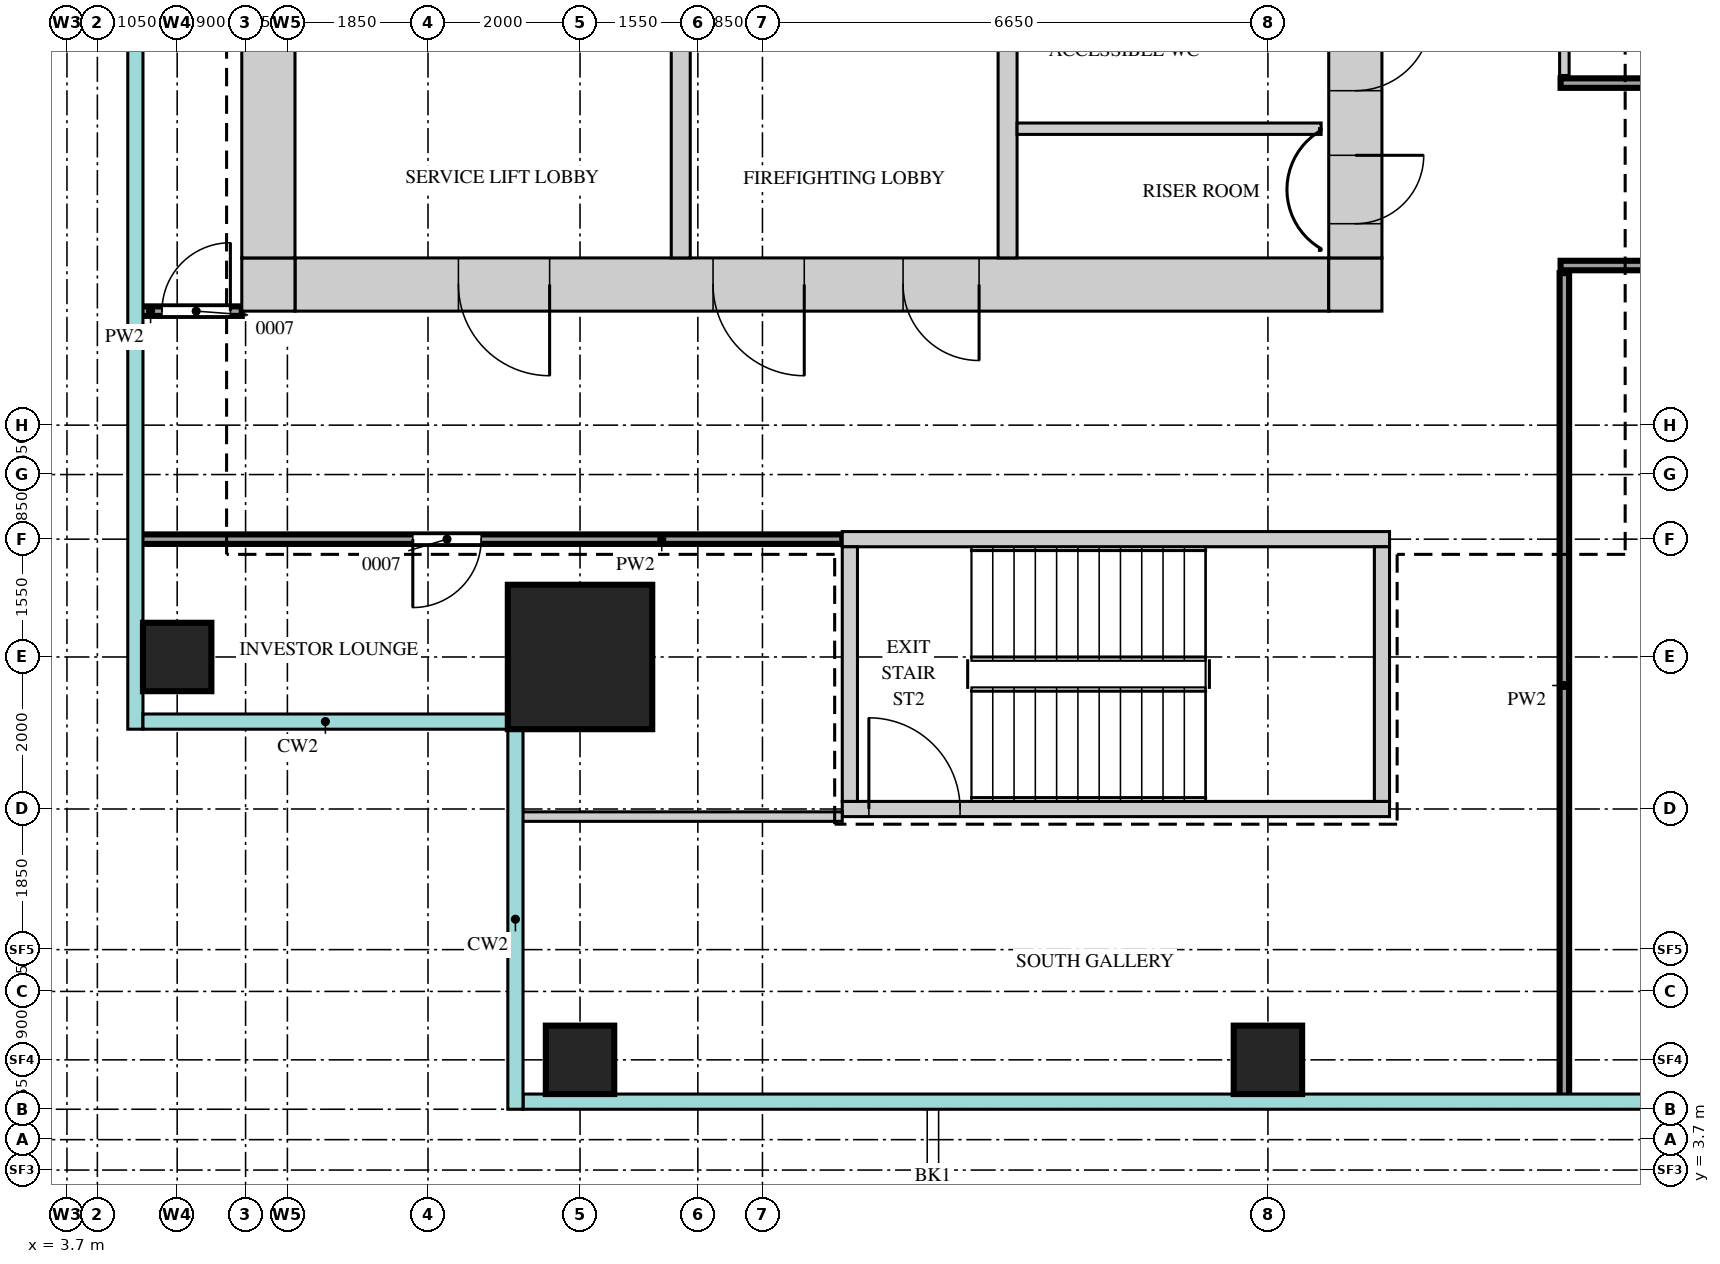
"""IFC4 building model, lengths in metres.
Left out: names, types, materials, properties, quantities, classifications, styles, units other than length and angle.
Written with IfcOpenShell. Run it as: python <this file> out.ifc"""

import sys

from ifc_helpers import new_model, si_unit, direction, frame, frame_2d, origin, origin_2d, place, context, subcontext, project, spatial, rectangle, extrude, source, transform, mapped, element, fill, save


model = new_model("IFC4")
c1 = context("Model", 3, precision=1e-05, world=origin(), true_north=direction((0.0, 1.0)))
c2 = subcontext(c1, "Body", "Model", "MODEL_VIEW")
j1 = project(units=[si_unit("LENGTHUNIT", "METRE"), si_unit("PLANEANGLEUNIT", "RADIAN")], contexts=[c1])
p1 = place(None, origin())
s1 = spatial("IfcSite", under=j1, at=p1, CompositionType="ELEMENT")
p2 = place(p1, origin())
s2 = spatial("IfcBuilding", under=s1, at=p2, CompositionType="ELEMENT")
p3 = place(p2, frame((0.0, 0.0, 238.2)))
s3 = spatial("IfcBuildingStorey", under=s2, at=p3, CompositionType="ELEMENT", Elevation=238.2)
m1 = source(origin(), c2, "Body", "SweptSolid", [
    extrude(rectangle(XDim=13.6, YDim=0.7, at=frame_2d((6.8, 0.0))), origin(), (0.0, 0.0, 1.0), 3.75),
])
p4 = place(p3, frame((6.7, 15.35, 0.0), z_axis=(0.0, 0.0, 1.0), x_axis=(1.0, 0.0, 0.0)))
e1 = element("IfcWall", 1, at=p4, inside=s3, PredefinedType="SHEAR", context=c2, shape_type="MappedRepresentation", body=[
    mapped(m1, transform((0.0, 0.0, 0.0))),
])
m2 = source(origin(), c2, "Body", "SweptSolid", [
    extrude(rectangle(XDim=1.2, YDim=2.1, at=frame_2d((0.6, 1.05))), frame((0.0, 0.36, 0.0), z_axis=(0.0, -1.0, 0.0), x_axis=(1.0, 0.0, 0.0)), (0.0, 0.0, 1.0), 0.72),
])
p5 = place(p4, frame((5.5, 0.0, 0.0)))
e2 = element("IfcOpeningElement", 2, at=p5, cuts=e1, PredefinedType="OPENING", context=c2, shape_type="MappedRepresentation", body=[
    mapped(m2, transform((0.0, 0.0, 0.0))),
])
p6 = place(p4, frame((2.15, 0.0, 0.0)))
e3 = element("IfcOpeningElement", 3, at=p6, cuts=e1, PredefinedType="OPENING", context=c2, shape_type="MappedRepresentation", body=[
    mapped(m2, transform((0.0, 0.0, 0.0))),
])
m3 = source(origin(), c2, "Body", "SweptSolid", [
    extrude(rectangle(XDim=1.0, YDim=2.1, at=frame_2d((0.5, 1.05))), frame((0.0, 0.36, 0.0), z_axis=(0.0, -1.0, 0.0), x_axis=(1.0, 0.0, 0.0)), (0.0, 0.0, 1.0), 0.72),
])
p7 = place(p4, frame((8.0, 0.0, 0.0)))
e4 = element("IfcOpeningElement", 4, at=p7, cuts=e1, PredefinedType="OPENING", context=c2, shape_type="MappedRepresentation", body=[
    mapped(m3, transform((0.0, 0.0, 0.0))),
])
m4 = source(origin(), c2, "Body", "SweptSolid", [
    extrude(rectangle(XDim=0.7, YDim=0.7, at=frame_2d((0.35, 0.0))), origin(), (0.0, 0.0, 1.0), 3.75),
])
for number, where, z_axis, x_axis in (
    (5, (20.3, 15.35, 0.0), (0.0, 0.0, 1.0), (1.0, 0.0, 0.0)),
    (6, (6.0, 15.35, 0.0), (0.0, 0.0, 1.0), (1.0, 0.0, 0.0)),
):
    element("IfcWall", number, at=place(p3, frame(where, z_axis=z_axis, x_axis=x_axis)), inside=s3, PredefinedType="SHEAR", context=c2, shape_type="MappedRepresentation", body=[
        mapped(m4, transform((0.0, 0.0, 0.0))),
    ])
m5 = source(origin(), c2, "Body", "SweptSolid", [
    extrude(rectangle(XDim=22.6, YDim=0.7, at=frame_2d((11.3, 0.0))), origin(), (0.0, 0.0, 1.0), 3.75),
])
p8 = place(p3, frame((20.65, 15.7, 0.0), z_axis=(0.0, 0.0, 1.0), x_axis=(0.0, 1.0, 0.0)))
e7 = element("IfcWall", 7, at=p8, inside=s3, PredefinedType="SHEAR", context=c2, shape_type="MappedRepresentation", body=[
    mapped(m5, transform((0.0, 0.0, 0.0))),
])
m6 = source(origin(), c2, "Body", "SweptSolid", [
    extrude(rectangle(XDim=1.8, YDim=2.1, at=frame_2d((0.9, 1.05))), frame((0.0, 0.36, 0.0), z_axis=(0.0, -1.0, 0.0), x_axis=(1.0, 0.0, 0.0)), (0.0, 0.0, 1.0), 0.72),
])
p9 = place(p8, frame((10.8, 0.0, 0.0)))
e8 = element("IfcOpeningElement", 8, at=p9, cuts=e7, PredefinedType="OPENING", context=c2, shape_type="MappedRepresentation", body=[
    mapped(m6, transform((0.0, 0.0, 0.0))),
])
m7 = source(origin(), c2, "Body", "SweptSolid", [
    extrude(rectangle(XDim=0.9, YDim=2.1, at=frame_2d((0.45, 1.05))), frame((0.0, 0.36, 0.0), z_axis=(0.0, -1.0, 0.0), x_axis=(1.0, 0.0, 0.0)), (0.0, 0.0, 1.0), 0.72),
])
p10 = place(p8, frame((0.45, 0.0, 0.0)))
e9 = element("IfcOpeningElement", 9, at=p10, cuts=e7, PredefinedType="OPENING", context=c2, shape_type="MappedRepresentation", body=[
    mapped(m7, transform((0.0, 0.0, 0.0))),
])
p11 = place(p8, frame((2.2, 0.0, 0.0)))
e10 = element("IfcOpeningElement", 10, at=p11, cuts=e7, PredefinedType="OPENING", context=c2, shape_type="MappedRepresentation", body=[
    mapped(m3, transform((0.0, 0.0, 0.0))),
])
p12 = place(p8, frame((5.0, 0.0, 0.0)))
e11 = element("IfcOpeningElement", 11, at=p12, cuts=e7, PredefinedType="OPENING", context=c2, shape_type="MappedRepresentation", body=[
    mapped(m7, transform((0.0, 0.0, 0.0))),
])
p13 = place(p3, frame((6.35, 15.7, 0.0), z_axis=(0.0, 0.0, 1.0), x_axis=(0.0, 1.0, 0.0)))
e12 = element("IfcWall", 12, at=p13, inside=s3, PredefinedType="SHEAR", context=c2, shape_type="MappedRepresentation", body=[
    mapped(m5, transform((0.0, 0.0, 0.0))),
])
m8 = source(origin(), c2, "Body", "SweptSolid", [
    extrude(rectangle(XDim=7.2, YDim=0.2, at=frame_2d((3.6, 0.0))), origin(), (0.0, 0.0, 1.0), 3.75),
])
p14 = place(p3, frame((13.9, 12.0, 0.0), z_axis=(0.0, 0.0, 1.0), x_axis=(1.0, 0.0, 0.0)))
e13 = element("IfcWall", 13, at=p14, inside=s3, PredefinedType="SHEAR", context=c2, shape_type="MappedRepresentation", body=[
    mapped(m8, transform((0.0, 0.0, 0.0))),
])
p15 = place(p3, frame((13.9, 8.45, 0.0), z_axis=(0.0, 0.0, 1.0), x_axis=(1.0, 0.0, 0.0)))
e14 = element("IfcWall", 14, at=p15, inside=s3, PredefinedType="SHEAR", context=c2, shape_type="MappedRepresentation", body=[
    mapped(m8, transform((0.0, 0.0, 0.0))),
])
m9 = source(origin(), c2, "Body", "SweptSolid", [
    extrude(rectangle(XDim=1.2, YDim=2.1, at=frame_2d((0.6, 1.05))), frame((0.0, 0.11, 0.0), z_axis=(0.0, -1.0, 0.0), x_axis=(1.0, 0.0, 0.0)), (0.0, 0.0, 1.0), 0.22),
])
p16 = place(p15, frame((0.35, 0.0, 0.0)))
e15 = element("IfcOpeningElement", 15, at=p16, cuts=e14, PredefinedType="OPENING", context=c2, shape_type="MappedRepresentation", body=[
    mapped(m9, transform((0.0, 0.0, 0.0))),
])
m10 = source(origin(), c2, "Body", "SweptSolid", [
    extrude(rectangle(XDim=3.35, YDim=0.2, at=frame_2d((1.675, 0.0))), origin(), (0.0, 0.0, 1.0), 3.75),
])
for number, where, z_axis, x_axis in (
    (16, (21.0, 8.55, 0.0), (0.0, 0.0, 1.0), (0.0, 1.0, 0.0)),
    (17, (14.0, 8.55, 0.0), (0.0, 0.0, 1.0), (0.0, 1.0, 0.0)),
):
    element("IfcWall", number, at=place(p3, frame(where, z_axis=z_axis, x_axis=x_axis)), inside=s3, PredefinedType="SHEAR", context=c2, shape_type="MappedRepresentation", body=[
        mapped(m10, transform((0.0, 0.0, 0.0))),
    ])
m11 = source(origin(), c2, "Body", "SweptSolid", [
    extrude(rectangle(XDim=3.5, YDim=0.25, at=frame_2d((1.75, 0.0))), origin(), (0.0, 0.0, 1.0), 3.75),
])
for number, where, z_axis, x_axis in (
    (18, (16.075, 15.7, 0.0), (0.0, 0.0, 1.0), (0.0, 1.0, 0.0)),
    (19, (11.775, 15.7, 0.0), (0.0, 0.0, 1.0), (0.0, 1.0, 0.0)),
):
    element("IfcWall", number, at=place(p3, frame(where, z_axis=z_axis, x_axis=x_axis)), inside=s3, PredefinedType="STANDARD", context=c2, shape_type="MappedRepresentation", body=[
        mapped(m11, transform((0.0, 0.0, 0.0))),
    ])
m12 = source(origin(), c2, "Body", "SweptSolid", [
    extrude(rectangle(XDim=1.9, YDim=1.9, at=origin_2d()), origin(), (0.0, 0.0, 1.0), 4.0),
])
p17 = place(p3, frame((10.45, 10.45, 0.0), z_axis=(0.0, 0.0, 1.0), x_axis=(1.0, 0.0, 0.0)))
e20 = element("IfcColumn", 20, at=p17, inside=s3, PredefinedType="COLUMN", context=c2, shape_type="MappedRepresentation", body=[
    mapped(m12, transform((0.0, 0.0, 0.0))),
])
m13 = source(origin(), c2, "Body", "SweptSolid", [
    extrude(rectangle(XDim=0.9, YDim=0.9, at=origin_2d()), origin(), (0.0, 0.0, 1.0), 3.75),
])
for number, where, z_axis, x_axis in (
    (21, (10.45, 5.15, 0.0), (0.0, 0.0, 1.0), (1.0, 0.0, 0.0)),
    (22, (19.5, 5.15, 0.0), (0.0, 0.0, 1.0), (1.0, 0.0, 0.0)),
    (23, (5.15, 10.45, 0.0), (0.0, 0.0, 1.0), (1.0, 0.0, 0.0)),
):
    element("IfcColumn", number, at=place(p3, frame(where, z_axis=z_axis, x_axis=x_axis)), inside=s3, PredefinedType="COLUMN", context=c2, shape_type="MappedRepresentation", body=[
        mapped(m13, transform((0.0, 0.0, 0.0))),
    ])
m14 = source(origin(), c2, "Body", "SweptSolid", [
    extrude(rectangle(XDim=10.85, YDim=0.125, at=frame_2d((5.425, 0.0))), origin(), (0.0, 0.0, 1.0), 3.8),
])
p18 = place(p3, frame((23.4, 4.65, 0.0), z_axis=(0.0, 0.0, 1.0), x_axis=(0.0, 1.0, 0.0)))
e24 = element("IfcWall", 24, at=p18, inside=s3, PredefinedType="PARTITIONING", context=c2, shape_type="MappedRepresentation", body=[
    mapped(m14, transform((0.0, 0.0, 0.0))),
])
m15 = source(origin(), c2, "Body", "SweptSolid", [
    extrude(rectangle(XDim=4.25, YDim=0.125, at=frame_2d((2.125, 0.0))), origin(), (0.0, 0.0, 1.0), 3.8),
])
p19 = place(p3, frame((9.65, 8.35, 0.0), z_axis=(0.0, 0.0, 1.0), x_axis=(1.0, 0.0, 0.0)))
e25 = element("IfcWall", 25, at=p19, inside=s3, PredefinedType="PARTITIONING", context=c2, shape_type="MappedRepresentation", body=[
    mapped(m15, transform((0.0, 0.0, 0.0))),
])
m16 = source(origin(), c2, "Body", "SweptSolid", [
    extrude(rectangle(XDim=9.25, YDim=0.125, at=frame_2d((4.625, 0.0))), origin(), (0.0, 0.0, 1.0), 3.8),
])
p20 = place(p3, frame((4.65, 12.0, 0.0), z_axis=(0.0, 0.0, 1.0), x_axis=(1.0, 0.0, 0.0)))
e26 = element("IfcWall", 26, at=p20, inside=s3, PredefinedType="PARTITIONING", context=c2, shape_type="MappedRepresentation", body=[
    mapped(m16, transform((0.0, 0.0, 0.0))),
])
m17 = source(origin(), c2, "Body", "SweptSolid", [
    extrude(rectangle(XDim=0.9, YDim=2.1, at=frame_2d((0.45, 1.05))), frame((0.0, 0.073, 0.0), z_axis=(0.0, -1.0, 0.0), x_axis=(1.0, 0.0, 0.0)), (0.0, 0.0, 1.0), 0.145),
])
p21 = place(p20, frame((3.6, 0.0, 0.0)))
e27 = element("IfcOpeningElement", 27, at=p21, cuts=e26, PredefinedType="OPENING", context=c2, shape_type="MappedRepresentation", body=[
    mapped(m17, transform((0.0, 0.0, 0.0))),
])
m18 = source(origin(), c2, "Body", "SweptSolid", [
    extrude(rectangle(XDim=1.35, YDim=0.125, at=frame_2d((0.675, 0.0))), origin(), (0.0, 0.0, 1.0), 3.8),
])
p22 = place(p3, frame((4.65, 15.0, 0.0), z_axis=(0.0, 0.0, 1.0), x_axis=(1.0, 0.0, 0.0)))
e28 = element("IfcWall", 28, at=p22, inside=s3, PredefinedType="PARTITIONING", context=c2, shape_type="MappedRepresentation", body=[
    mapped(m18, transform((0.0, 0.0, 0.0))),
])
p23 = place(p22, frame((0.3, 0.0, 0.0)))
e29 = element("IfcOpeningElement", 29, at=p23, cuts=e28, PredefinedType="OPENING", context=c2, shape_type="MappedRepresentation", body=[
    mapped(m17, transform((0.0, 0.0, 0.0))),
])
m19 = source(origin(), c2, "Body", "SweptSolid", [
    extrude(rectangle(XDim=26.0, YDim=0.125, at=frame_2d((13.0, 0.0))), origin(), (0.0, 0.0, 1.0), 3.8),
])
p24 = place(p3, frame((23.35, 15.6, 0.0), z_axis=(0.0, 0.0, 1.0), x_axis=(1.0, 0.0, 0.0)))
e30 = element("IfcWall", 30, at=p24, inside=s3, PredefinedType="PARTITIONING", context=c2, shape_type="MappedRepresentation", body=[
    mapped(m19, transform((0.0, 0.0, 0.0))),
])
m20 = source(origin(), c2, "Body", "SweptSolid", [
    extrude(rectangle(XDim=1.2, YDim=2.1, at=frame_2d((0.6, 1.05))), frame((0.0, 0.073, 0.0), z_axis=(0.0, -1.0, 0.0), x_axis=(1.0, 0.0, 0.0)), (0.0, 0.0, 1.0), 0.145),
])
p25 = place(p24, frame((5.0, 0.0, 0.0)))
e31 = element("IfcOpeningElement", 31, at=p25, cuts=e30, PredefinedType="OPENING", context=c2, shape_type="MappedRepresentation", body=[
    mapped(m20, transform((0.0, 0.0, 0.0))),
])
p26 = place(p24, frame((15.1, 0.0, 0.0)))
e32 = element("IfcOpeningElement", 32, at=p26, cuts=e30, PredefinedType="OPENING", context=c2, shape_type="MappedRepresentation", body=[
    mapped(m17, transform((0.0, 0.0, 0.0))),
])
p27 = place(p24, frame((22.6, 0.0, 0.0)))
e33 = element("IfcOpeningElement", 33, at=p27, cuts=e30, PredefinedType="OPENING", context=c2, shape_type="MappedRepresentation", body=[
    mapped(m17, transform((0.0, 0.0, 0.0))),
])
m21 = source(origin(), c2, "Body", "SweptSolid", [
    extrude(rectangle(XDim=4.0, YDim=0.15, at=frame_2d((2.0, 0.0))), origin(), (0.0, 0.0, 1.0), 3.8),
])
p28 = place(p3, frame((16.2, 17.4, 0.0), z_axis=(0.0, 0.0, 1.0), x_axis=(1.0, 0.0, 0.0)))
e34 = element("IfcWall", 34, at=p28, inside=s3, PredefinedType="PARTITIONING", context=c2, shape_type="MappedRepresentation", body=[
    mapped(m21, transform((0.0, 0.0, 0.0))),
])
p29 = place(p3, frame((23.35, 18.0, 0.0), z_axis=(0.0, 0.0, 1.0), x_axis=(1.0, 0.0, 0.0)))
e35 = element("IfcWall", 35, at=p29, inside=s3, PredefinedType="PARTITIONING", context=c2, shape_type="MappedRepresentation", body=[
    mapped(m19, transform((0.0, 0.0, 0.0))),
])
p30 = place(p29, frame((4.05, 0.0, 0.0)))
e36 = element("IfcOpeningElement", 36, at=p30, cuts=e35, PredefinedType="OPENING", context=c2, shape_type="MappedRepresentation", body=[
    mapped(m17, transform((0.0, 0.0, 0.0))),
])
m22 = source(origin(), c2, "Body", "SweptSolid", [
    extrude(rectangle(XDim=1.0, YDim=2.1, at=frame_2d((0.5, 1.05))), frame((0.0, 0.073, 0.0), z_axis=(0.0, -1.0, 0.0), x_axis=(1.0, 0.0, 0.0)), (0.0, 0.0, 1.0), 0.145),
])
p31 = place(p29, frame((7.4, 0.0, 0.0)))
e37 = element("IfcOpeningElement", 37, at=p31, cuts=e35, PredefinedType="OPENING", context=c2, shape_type="MappedRepresentation", body=[
    mapped(m22, transform((0.0, 0.0, 0.0))),
])
p32 = place(p29, frame((12.55, 0.0, 0.0)))
e38 = element("IfcOpeningElement", 38, at=p32, cuts=e35, PredefinedType="OPENING", context=c2, shape_type="MappedRepresentation", body=[
    mapped(m17, transform((0.0, 0.0, 0.0))),
])
p33 = place(p29, frame((20.8, 0.0, 0.0)))
e39 = element("IfcOpeningElement", 39, at=p33, cuts=e35, PredefinedType="OPENING", context=c2, shape_type="MappedRepresentation", body=[
    mapped(m17, transform((0.0, 0.0, 0.0))),
])
m23 = source(origin(), c2, "Body", "SweptSolid", [
    extrude(rectangle(XDim=6.8, YDim=0.125, at=frame_2d((3.4, 0.0))), origin(), (0.0, 0.0, 1.0), 3.8),
])
p34 = place(p3, frame((23.4, 18.1, 0.0), z_axis=(0.0, 0.0, 1.0), x_axis=(0.0, 1.0, 0.0)))
e40 = element("IfcWall", 40, at=p34, inside=s3, PredefinedType="PARTITIONING", context=c2, shape_type="MappedRepresentation", body=[
    mapped(m23, transform((0.0, 0.0, 0.0))),
])
p35 = place(p34, frame((2.8, 0.0, 0.0)))
e41 = element("IfcOpeningElement", 41, at=p35, cuts=e40, PredefinedType="OPENING", context=c2, shape_type="MappedRepresentation", body=[
    mapped(m17, transform((0.0, 0.0, 0.0))),
])
m24 = source(origin(), c2, "Body", "SweptSolid", [
    extrude(rectangle(XDim=0.9, YDim=2.1, at=frame_2d((0.45, 1.05))), frame((0.0, 0.3, 0.0), z_axis=(0.0, -1.0, 0.0), x_axis=(1.0, 0.0, 0.0)), (0.0, 0.0, 1.0), 0.6),
])
p36 = place(p10, origin())
e42 = element("IfcDoor", 42, at=p36, inside=s3, OperationType="SINGLE_SWING_RIGHT", PredefinedType="DOOR", context=c2, shape_type="MappedRepresentation", body=[
    mapped(m24, transform((0.0, 0.0, 0.0))),
])
fill(e9, e42)
m25 = source(origin(), c2, "Body", "SweptSolid", [
    extrude(rectangle(XDim=1.0, YDim=2.1, at=frame_2d((0.5, 1.05))), frame((0.0, 0.3, 0.0), z_axis=(0.0, -1.0, 0.0), x_axis=(1.0, 0.0, 0.0)), (0.0, 0.0, 1.0), 0.6),
])
p37 = place(p11, origin())
e43 = element("IfcDoor", 43, at=p37, inside=s3, OperationType="SINGLE_SWING_RIGHT", PredefinedType="DOOR", context=c2, shape_type="MappedRepresentation", body=[
    mapped(m25, transform((0.0, 0.0, 0.0))),
])
fill(e10, e43)
m26 = source(origin(), c2, "Body", "SweptSolid", [
    extrude(rectangle(XDim=1.2, YDim=2.1, at=frame_2d((0.6, 1.05))), frame((0.0, 0.3, 0.0), z_axis=(0.0, -1.0, 0.0), x_axis=(1.0, 0.0, 0.0)), (0.0, 0.0, 1.0), 0.6),
])
p38 = place(p5, origin())
e44 = element("IfcDoor", 44, at=p38, inside=s3, OperationType="SINGLE_SWING_RIGHT", PredefinedType="DOOR", context=c2, shape_type="MappedRepresentation", body=[
    mapped(m26, transform((0.0, 0.0, 0.0))),
])
fill(e2, e44)
p39 = place(p6, origin())
e45 = element("IfcDoor", 45, at=p39, inside=s3, OperationType="SINGLE_SWING_RIGHT", PredefinedType="DOOR", context=c2, shape_type="MappedRepresentation", body=[
    mapped(m26, transform((0.0, 0.0, 0.0))),
])
fill(e3, e45)
p40 = place(p7, origin())
e46 = element("IfcDoor", 46, at=p40, inside=s3, OperationType="SINGLE_SWING_RIGHT", PredefinedType="DOOR", context=c2, shape_type="MappedRepresentation", body=[
    mapped(m25, transform((0.0, 0.0, 0.0))),
])
fill(e4, e46)
m27 = source(origin(), c2, "Body", "SweptSolid", [
    extrude(rectangle(XDim=0.9, YDim=2.1, at=frame_2d((0.45, 1.05))), frame((0.0, 0.025, 0.0), z_axis=(0.0, -1.0, 0.0), x_axis=(1.0, 0.0, 0.0)), (0.0, 0.0, 1.0), 0.05),
])
p41 = place(p23, origin())
e47 = element("IfcDoor", 47, at=p41, inside=s3, OperationType="SINGLE_SWING_LEFT", PredefinedType="DOOR", context=c2, shape_type="MappedRepresentation", body=[
    mapped(m27, transform((0.0, 0.0, 0.0))),
])
fill(e29, e47)
p42 = place(p21, origin())
e48 = element("IfcDoor", 48, at=p42, inside=s3, OperationType="SINGLE_SWING_LEFT", PredefinedType="DOOR", context=c2, shape_type="MappedRepresentation", body=[
    mapped(m27, transform((0.0, 0.0, 0.0))),
])
fill(e27, e48)
m28 = source(origin(), c2, "Body", "SweptSolid", [
    extrude(rectangle(XDim=1.2, YDim=2.1, at=frame_2d((0.6, 1.05))), frame((0.0, 0.025, 0.0), z_axis=(0.0, -1.0, 0.0), x_axis=(1.0, 0.0, 0.0)), (0.0, 0.0, 1.0), 0.05),
])
p43 = place(p16, origin())
e49 = element("IfcDoor", 49, at=p43, inside=s3, OperationType="SINGLE_SWING_RIGHT", PredefinedType="DOOR", context=c2, shape_type="MappedRepresentation", body=[
    mapped(m28, transform((0.0, 0.0, 0.0))),
])
fill(e15, e49)
save(model, sys.argv[1])
